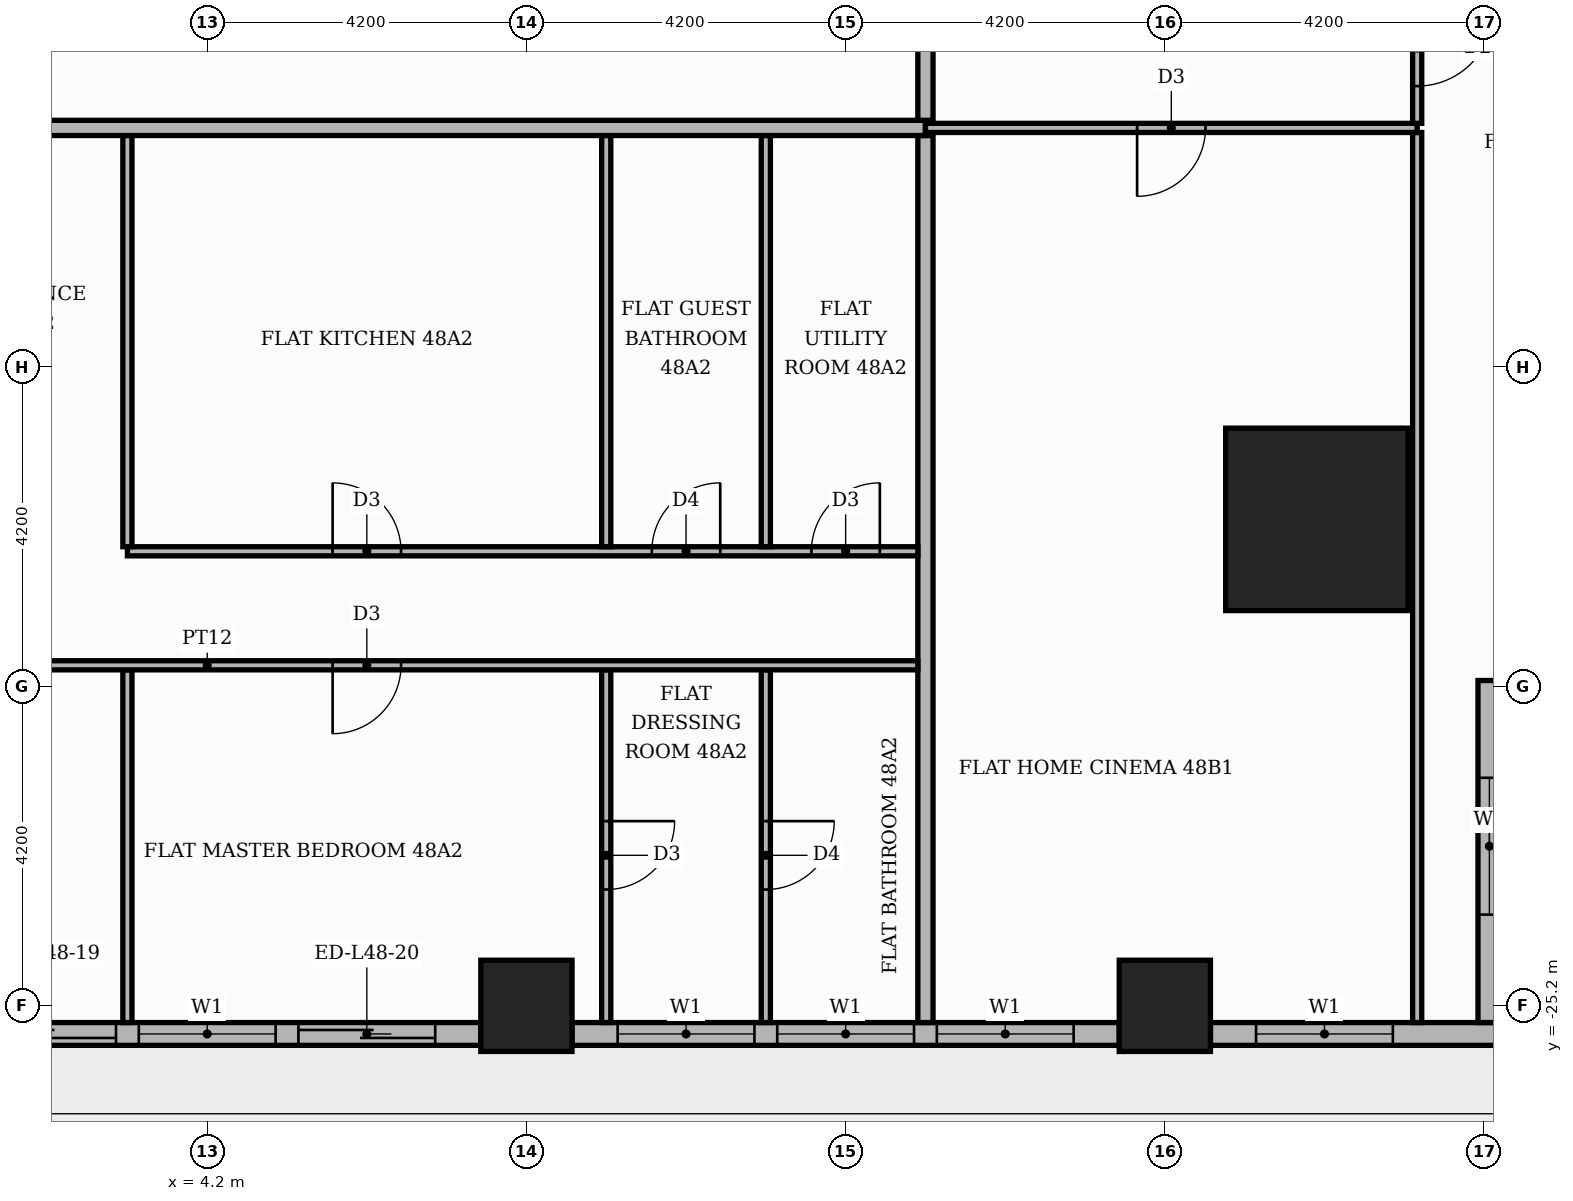
"""IFC4 building model, lengths in metres.
Left out: names, types, materials, properties, quantities, classifications, styles, units other than length and angle.
Written with IfcOpenShell. Run it as: python <this file> out.ifc"""

import sys

from ifc_helpers import new_model, si_unit, direction, frame, frame_2d, origin, origin_2d, place, context, subcontext, project, spatial, rectangle, extrude, element, fill, save


model = new_model("IFC4")
c1 = context("Model", 3, precision=1e-05, world=origin(), true_north=direction((0.0, 1.0)))
c2 = subcontext(c1, "Body", "Model", "MODEL_VIEW")
j1 = project(units=[si_unit("LENGTHUNIT", "METRE"), si_unit("PLANEANGLEUNIT", "RADIAN")], contexts=[c1])
p1 = place(None, origin())
s1 = spatial("IfcSite", under=j1, at=p1, CompositionType="ELEMENT")
p2 = place(p1, origin())
s2 = spatial("IfcBuilding", under=s1, at=p2, CompositionType="ELEMENT")
p3 = place(p2, frame((0.0, 0.0, 204.0)))
s3 = spatial("IfcBuildingStorey", under=s2, at=p3, CompositionType="ELEMENT", Elevation=204.0)
p4 = place(p3, frame((18.8, -18.8, 0.0), z_axis=(0.0, 0.0, 1.0), x_axis=(1.0, 0.0, 0.0)))
e1 = element("IfcColumn", 1, at=p4, inside=s3, PredefinedType="COLUMN", context=c2, shape_type="SweptSolid", body=[
    extrude(rectangle(XDim=2.4, YDim=2.4, at=origin_2d()), origin(), (0.0, 0.0, 1.0), 3.9),
])
for number, where, z_axis, x_axis in (
    (2, (8.4, -25.2, 0.0), (0.0, 0.0, 1.0), (1.0, 0.0, 0.0)),
    (3, (16.8, -25.2, 0.0), (0.0, 0.0, 1.0), (1.0, 0.0, 0.0)),
):
    element("IfcColumn", number, at=place(p3, frame(where, z_axis=z_axis, x_axis=x_axis)), inside=s3, PredefinedType="COLUMN", context=c2, shape_type="SweptSolid", body=[
        extrude(rectangle(XDim=1.2, YDim=1.2, at=origin_2d()), origin(), (0.0, 0.0, 1.0), 3.9),
    ])
p5 = place(p3, frame((0.6, -25.57, 0.0), z_axis=(0.0, 0.0, 1.0), x_axis=(1.0, 0.0, 0.0)))
e4 = element("IfcWall", 4, at=p5, inside=s3, PredefinedType="STANDARD", context=c2, shape_type="SweptSolid", body=[
    extrude(rectangle(XDim=7.2, YDim=0.3, at=frame_2d((3.6, 0.0))), origin(), (0.0, 0.0, 1.0), 3.48),
])
p6 = place(p5, frame((0.6, 0.0, 0.0)))
e5 = element("IfcOpeningElement", 5, at=p6, cuts=e4, PredefinedType="OPENING", context=c2, shape_type="SweptSolid", body=[
    extrude(rectangle(XDim=1.8, YDim=2.4, at=frame_2d((0.9, 1.2))), frame((0.0, 0.16, 0.0), z_axis=(0.0, -1.0, 0.0), x_axis=(1.0, 0.0, 0.0)), (0.0, 0.0, 1.0), 0.32),
])
p7 = place(p5, frame((2.7, 0.0, 0.9)))
e6 = element("IfcOpeningElement", 6, at=p7, cuts=e4, PredefinedType="OPENING", context=c2, shape_type="SweptSolid", body=[
    extrude(rectangle(XDim=1.8, YDim=2.1, at=frame_2d((0.9, 1.05))), frame((0.0, 0.16, 0.0), z_axis=(0.0, -1.0, 0.0), x_axis=(1.0, 0.0, 0.0)), (0.0, 0.0, 1.0), 0.32),
])
p8 = place(p5, frame((4.8, 0.0, 0.0)))
e7 = element("IfcOpeningElement", 7, at=p8, cuts=e4, PredefinedType="OPENING", context=c2, shape_type="SweptSolid", body=[
    extrude(rectangle(XDim=1.8, YDim=2.4, at=frame_2d((0.9, 1.2))), frame((0.0, 0.16, 0.0), z_axis=(0.0, -1.0, 0.0), x_axis=(1.0, 0.0, 0.0)), (0.0, 0.0, 1.0), 0.32),
])
p9 = place(p3, frame((9.0, -25.57, 0.0), z_axis=(0.0, 0.0, 1.0), x_axis=(1.0, 0.0, 0.0)))
e8 = element("IfcWall", 8, at=p9, inside=s3, PredefinedType="STANDARD", context=c2, shape_type="SweptSolid", body=[
    extrude(rectangle(XDim=7.2, YDim=0.3, at=frame_2d((3.6, 0.0))), origin(), (0.0, 0.0, 1.0), 3.48),
])
p10 = place(p9, frame((0.6, 0.0, 0.9)))
e9 = element("IfcOpeningElement", 9, at=p10, cuts=e8, PredefinedType="OPENING", context=c2, shape_type="SweptSolid", body=[
    extrude(rectangle(XDim=1.8, YDim=2.1, at=frame_2d((0.9, 1.05))), frame((0.0, 0.16, 0.0), z_axis=(0.0, -1.0, 0.0), x_axis=(1.0, 0.0, 0.0)), (0.0, 0.0, 1.0), 0.32),
])
p11 = place(p9, frame((2.7, 0.0, 0.9)))
e10 = element("IfcOpeningElement", 10, at=p11, cuts=e8, PredefinedType="OPENING", context=c2, shape_type="SweptSolid", body=[
    extrude(rectangle(XDim=1.8, YDim=2.1, at=frame_2d((0.9, 1.05))), frame((0.0, 0.16, 0.0), z_axis=(0.0, -1.0, 0.0), x_axis=(1.0, 0.0, 0.0)), (0.0, 0.0, 1.0), 0.32),
])
p12 = place(p9, frame((4.8, 0.0, 0.9)))
e11 = element("IfcOpeningElement", 11, at=p12, cuts=e8, PredefinedType="OPENING", context=c2, shape_type="SweptSolid", body=[
    extrude(rectangle(XDim=1.8, YDim=2.1, at=frame_2d((0.9, 1.05))), frame((0.0, 0.16, 0.0), z_axis=(0.0, -1.0, 0.0), x_axis=(1.0, 0.0, 0.0)), (0.0, 0.0, 1.0), 0.32),
])
p13 = place(p3, frame((17.4, -25.57, 0.0), z_axis=(0.0, 0.0, 1.0), x_axis=(1.0, 0.0, 0.0)))
e12 = element("IfcWall", 12, at=p13, inside=s3, PredefinedType="STANDARD", context=c2, shape_type="SweptSolid", body=[
    extrude(rectangle(XDim=3.82, YDim=0.3, at=frame_2d((1.91, 0.0))), origin(), (0.0, 0.0, 1.0), 3.48),
])
p14 = place(p13, frame((0.6, 0.0, 0.9)))
e13 = element("IfcOpeningElement", 13, at=p14, cuts=e12, PredefinedType="OPENING", context=c2, shape_type="SweptSolid", body=[
    extrude(rectangle(XDim=1.8, YDim=2.1, at=frame_2d((0.9, 1.05))), frame((0.0, 0.16, 0.0), z_axis=(0.0, -1.0, 0.0), x_axis=(1.0, 0.0, 0.0)), (0.0, 0.0, 1.0), 0.32),
])
p15 = place(p3, frame((21.07, -25.42, 0.0), z_axis=(0.0, 0.0, 1.0), x_axis=(0.0, 1.0, 0.0)))
e14 = element("IfcWall", 14, at=p15, inside=s3, PredefinedType="STANDARD", context=c2, shape_type="SweptSolid", body=[
    extrude(rectangle(XDim=4.5, YDim=0.3, at=frame_2d((2.25, 0.0))), origin(), (0.0, 0.0, 1.0), 3.48),
])
p16 = place(p15, frame((1.42, 0.0, 0.9)))
e15 = element("IfcOpeningElement", 15, at=p16, cuts=e14, PredefinedType="OPENING", context=c2, shape_type="SweptSolid", body=[
    extrude(rectangle(XDim=1.8, YDim=2.1, at=frame_2d((0.9, 1.05))), frame((0.0, 0.16, 0.0), z_axis=(0.0, -1.0, 0.0), x_axis=(1.0, 0.0, 0.0)), (0.0, 0.0, 1.0), 0.32),
])
p17 = place(p3, frame((3.15, -25.42, 0.0), z_axis=(0.0, 0.0, 1.0), x_axis=(0.0, 1.0, 0.0)))
e16 = element("IfcWall", 16, at=p17, inside=s3, PredefinedType="PARTITIONING", context=c2, shape_type="SweptSolid", body=[
    extrude(rectangle(XDim=4.64, YDim=0.12, at=frame_2d((2.32, 0.0))), origin(), (0.0, 0.0, 1.0), 3.48),
])
p18 = place(p3, frame((9.45, -25.42, 0.0), z_axis=(0.0, 0.0, 1.0), x_axis=(0.0, 1.0, 0.0)))
e17 = element("IfcWall", 17, at=p18, inside=s3, PredefinedType="PARTITIONING", context=c2, shape_type="SweptSolid", body=[
    extrude(rectangle(XDim=4.64, YDim=0.12, at=frame_2d((2.32, 0.0))), origin(), (0.0, 0.0, 1.0), 3.48),
])
p19 = place(p18, frame((1.75, 0.0, 0.0)))
e18 = element("IfcOpeningElement", 18, at=p19, cuts=e17, PredefinedType="OPENING", context=c2, shape_type="SweptSolid", body=[
    extrude(rectangle(XDim=0.9, YDim=2.1, at=frame_2d((0.45, 1.05))), frame((0.0, 0.07, 0.0), z_axis=(0.0, -1.0, 0.0), x_axis=(1.0, 0.0, 0.0)), (0.0, 0.0, 1.0), 0.14),
])
p20 = place(p3, frame((11.55, -25.42, 0.0), z_axis=(0.0, 0.0, 1.0), x_axis=(0.0, 1.0, 0.0)))
e19 = element("IfcWall", 19, at=p20, inside=s3, PredefinedType="PARTITIONING", context=c2, shape_type="SweptSolid", body=[
    extrude(rectangle(XDim=4.64, YDim=0.12, at=frame_2d((2.32, 0.0))), origin(), (0.0, 0.0, 1.0), 3.48),
])
p21 = place(p20, frame((1.75, 0.0, 0.0)))
e20 = element("IfcOpeningElement", 20, at=p21, cuts=e19, PredefinedType="OPENING", context=c2, shape_type="SweptSolid", body=[
    extrude(rectangle(XDim=0.9, YDim=2.1, at=frame_2d((0.45, 1.05))), frame((0.0, 0.07, 0.0), z_axis=(0.0, -1.0, 0.0), x_axis=(1.0, 0.0, 0.0)), (0.0, 0.0, 1.0), 0.14),
])
p22 = place(p3, frame((13.65, -25.42, 0.0), z_axis=(0.0, 0.0, 1.0), x_axis=(0.0, 1.0, 0.0)))
e21 = element("IfcWall", 21, at=p22, inside=s3, PredefinedType="PARTITIONING", context=c2, shape_type="SweptSolid", body=[
    extrude(rectangle(XDim=11.67, YDim=0.2, at=frame_2d((5.835, 0.0))), origin(), (0.0, 0.0, 1.0), 3.48),
])
p23 = place(p3, frame((20.12, -25.42, 0.0), z_axis=(0.0, 0.0, 1.0), x_axis=(0.0, 1.0, 0.0)))
e22 = element("IfcWall", 22, at=p23, inside=s3, PredefinedType="PARTITIONING", context=c2, shape_type="SweptSolid", body=[
    extrude(rectangle(XDim=11.71, YDim=0.12, at=frame_2d((5.855, 0.0))), origin(), (0.0, 0.0, 1.0), 3.48),
])
p24 = place(p3, frame((-5.15, -20.72, 0.0), z_axis=(0.0, 0.0, 1.0), x_axis=(1.0, 0.0, 0.0)))
e23 = element("IfcWall", 23, at=p24, inside=s3, PredefinedType="PARTITIONING", context=c2, shape_type="SweptSolid", body=[
    extrude(rectangle(XDim=18.7, YDim=0.12, at=frame_2d((9.35, 0.0))), origin(), (0.0, 0.0, 1.0), 3.48),
])
p25 = place(p24, frame((3.6, 0.0, 0.0)))
e24 = element("IfcOpeningElement", 24, at=p25, cuts=e23, PredefinedType="OPENING", context=c2, shape_type="SweptSolid", body=[
    extrude(rectangle(XDim=1.0, YDim=2.1, at=frame_2d((0.5, 1.05))), frame((0.0, 0.07, 0.0), z_axis=(0.0, -1.0, 0.0), x_axis=(1.0, 0.0, 0.0)), (0.0, 0.0, 1.0), 0.14),
])
p26 = place(p24, frame((11.0, 0.0, 0.0)))
e25 = element("IfcOpeningElement", 25, at=p26, cuts=e23, PredefinedType="OPENING", context=c2, shape_type="SweptSolid", body=[
    extrude(rectangle(XDim=0.9, YDim=2.1, at=frame_2d((0.45, 1.05))), frame((0.0, 0.07, 0.0), z_axis=(0.0, -1.0, 0.0), x_axis=(1.0, 0.0, 0.0)), (0.0, 0.0, 1.0), 0.14),
])
p27 = place(p3, frame((3.15, -19.22, 0.0), z_axis=(0.0, 0.0, 1.0), x_axis=(1.0, 0.0, 0.0)))
e26 = element("IfcWall", 26, at=p27, inside=s3, PredefinedType="PARTITIONING", context=c2, shape_type="SweptSolid", body=[
    extrude(rectangle(XDim=10.4, YDim=0.12, at=frame_2d((5.2, 0.0))), origin(), (0.0, 0.0, 1.0), 3.48),
])
p28 = place(p27, frame((2.7, 0.0, 0.0)))
e27 = element("IfcOpeningElement", 27, at=p28, cuts=e26, PredefinedType="OPENING", context=c2, shape_type="SweptSolid", body=[
    extrude(rectangle(XDim=0.9, YDim=2.1, at=frame_2d((0.45, 1.05))), frame((0.0, 0.07, 0.0), z_axis=(0.0, -1.0, 0.0), x_axis=(1.0, 0.0, 0.0)), (0.0, 0.0, 1.0), 0.14),
])
p29 = place(p27, frame((6.9, 0.0, 0.0)))
e28 = element("IfcOpeningElement", 28, at=p29, cuts=e26, PredefinedType="OPENING", context=c2, shape_type="SweptSolid", body=[
    extrude(rectangle(XDim=0.9, YDim=2.1, at=frame_2d((0.45, 1.05))), frame((0.0, 0.07, 0.0), z_axis=(0.0, -1.0, 0.0), x_axis=(1.0, 0.0, 0.0)), (0.0, 0.0, 1.0), 0.14),
])
p30 = place(p27, frame((9.0, 0.0, 0.0)))
e29 = element("IfcOpeningElement", 29, at=p30, cuts=e26, PredefinedType="OPENING", context=c2, shape_type="SweptSolid", body=[
    extrude(rectangle(XDim=0.9, YDim=2.1, at=frame_2d((0.45, 1.05))), frame((0.0, 0.07, 0.0), z_axis=(0.0, -1.0, 0.0), x_axis=(1.0, 0.0, 0.0)), (0.0, 0.0, 1.0), 0.14),
])
for number, where, z_axis, x_axis in (
    (30, (3.15, -19.16, 0.0), (0.0, 0.0, 1.0), (0.0, 1.0, 0.0)),
    (31, (9.45, -19.16, 0.0), (0.0, 0.0, 1.0), (0.0, 1.0, 0.0)),
    (32, (11.55, -19.16, 0.0), (0.0, 0.0, 1.0), (0.0, 1.0, 0.0)),
):
    element("IfcWall", number, at=place(p3, frame(where, z_axis=z_axis, x_axis=x_axis)), inside=s3, PredefinedType="PARTITIONING", context=c2, shape_type="SweptSolid", body=[
        extrude(rectangle(XDim=5.41, YDim=0.12, at=frame_2d((2.705, 0.0))), origin(), (0.0, 0.0, 1.0), 3.48),
    ])
p31 = place(p3, frame((-25.42, -13.65, 0.0), z_axis=(0.0, 0.0, 1.0), x_axis=(1.0, 0.0, 0.0)))
e33 = element("IfcWall", 33, at=p31, inside=s3, PredefinedType="PARTITIONING", context=c2, shape_type="SweptSolid", body=[
    extrude(rectangle(XDim=39.07, YDim=0.2, at=frame_2d((19.535, 0.0))), origin(), (0.0, 0.0, 1.0), 3.48),
])
p32 = place(p31, frame((13.32, 0.0, 0.0)))
e34 = element("IfcOpeningElement", 34, at=p32, cuts=e33, PredefinedType="OPENING", context=c2, shape_type="SweptSolid", body=[
    extrude(rectangle(XDim=1.1, YDim=2.4, at=frame_2d((0.55, 1.2))), frame((0.0, 0.11, 0.0), z_axis=(0.0, -1.0, 0.0), x_axis=(1.0, 0.0, 0.0)), (0.0, 0.0, 1.0), 0.22),
])
p33 = place(p31, frame((25.92, 0.0, 0.0)))
e35 = element("IfcOpeningElement", 35, at=p33, cuts=e33, PredefinedType="OPENING", context=c2, shape_type="SweptSolid", body=[
    extrude(rectangle(XDim=1.1, YDim=2.4, at=frame_2d((0.55, 1.2))), frame((0.0, 0.11, 0.0), z_axis=(0.0, -1.0, 0.0), x_axis=(1.0, 0.0, 0.0)), (0.0, 0.0, 1.0), 0.22),
])
p34 = place(p3, frame((13.65, -13.65, 0.0), z_axis=(0.0, 0.0, 1.0), x_axis=(1.0, 0.0, 0.0)))
e36 = element("IfcWall", 36, at=p34, inside=s3, PredefinedType="PARTITIONING", context=c2, shape_type="SweptSolid", body=[
    extrude(rectangle(XDim=6.47, YDim=0.12, at=frame_2d((3.235, 0.0))), origin(), (0.0, 0.0, 1.0), 3.48),
])
p35 = place(p34, frame((2.785, 0.0, 0.0)))
e37 = element("IfcOpeningElement", 37, at=p35, cuts=e36, PredefinedType="OPENING", context=c2, shape_type="SweptSolid", body=[
    extrude(rectangle(XDim=0.9, YDim=2.1, at=frame_2d((0.45, 1.05))), frame((0.0, 0.07, 0.0), z_axis=(0.0, -1.0, 0.0), x_axis=(1.0, 0.0, 0.0)), (0.0, 0.0, 1.0), 0.14),
])
p36 = place(p3, frame((20.12, -13.59, 0.0), z_axis=(0.0, 0.0, 1.0), x_axis=(0.0, 1.0, 0.0)))
e38 = element("IfcWall", 38, at=p36, inside=s3, PredefinedType="PARTITIONING", context=c2, shape_type="SweptSolid", body=[
    extrude(rectangle(XDim=1.98, YDim=0.12, at=frame_2d((0.99, 0.0))), origin(), (0.0, 0.0, 1.0), 3.48),
])
p37 = place(p36, frame((0.49, 0.0, 0.0)))
e39 = element("IfcOpeningElement", 39, at=p37, cuts=e38, PredefinedType="OPENING", context=c2, shape_type="SweptSolid", body=[
    extrude(rectangle(XDim=1.0, YDim=2.1, at=frame_2d((0.5, 1.05))), frame((0.0, 0.07, 0.0), z_axis=(0.0, -1.0, 0.0), x_axis=(1.0, 0.0, 0.0)), (0.0, 0.0, 1.0), 0.14),
])
p38 = place(p3, frame((13.65, -13.55, 0.0), z_axis=(0.0, 0.0, 1.0), x_axis=(0.0, 1.0, 0.0)))
e40 = element("IfcWall", 40, at=p38, inside=s3, PredefinedType="PARTITIONING", context=c2, shape_type="SweptSolid", body=[
    extrude(rectangle(XDim=2.45, YDim=0.2, at=frame_2d((1.225, 0.0))), origin(), (0.0, 0.0, 1.0), 3.48),
])
p39 = place(p6, origin())
e41 = element("IfcDoor", 41, at=p39, inside=s3, OperationType="SLIDING_TO_LEFT", PredefinedType="DOOR", context=c2, shape_type="SweptSolid", body=[
    extrude(rectangle(XDim=1.8, YDim=2.4, at=frame_2d((0.9, 1.2))), frame((0.0, 0.025, 0.0), z_axis=(0.0, -1.0, 0.0), x_axis=(1.0, 0.0, 0.0)), (0.0, 0.0, 1.0), 0.05),
])
fill(e5, e41)
p40 = place(p7, origin())
e42 = element("IfcWindow", 42, at=p40, inside=s3, PartitioningType="SINGLE_PANEL", PredefinedType="WINDOW", context=c2, shape_type="SweptSolid", body=[
    extrude(rectangle(XDim=1.8, YDim=2.1, at=frame_2d((0.9, 1.05))), frame((0.0, 0.03, 0.0), z_axis=(0.0, -1.0, 0.0), x_axis=(1.0, 0.0, 0.0)), (0.0, 0.0, 1.0), 0.06),
])
fill(e6, e42)
p41 = place(p8, origin())
e43 = element("IfcDoor", 43, at=p41, inside=s3, OperationType="SLIDING_TO_RIGHT", PredefinedType="DOOR", context=c2, shape_type="SweptSolid", body=[
    extrude(rectangle(XDim=1.8, YDim=2.4, at=frame_2d((0.9, 1.2))), frame((0.0, 0.025, 0.0), z_axis=(0.0, -1.0, 0.0), x_axis=(1.0, 0.0, 0.0)), (0.0, 0.0, 1.0), 0.05),
])
fill(e7, e43)
p42 = place(p10, origin())
e44 = element("IfcWindow", 44, at=p42, inside=s3, PartitioningType="SINGLE_PANEL", PredefinedType="WINDOW", context=c2, shape_type="SweptSolid", body=[
    extrude(rectangle(XDim=1.8, YDim=2.1, at=frame_2d((0.9, 1.05))), frame((0.0, 0.03, 0.0), z_axis=(0.0, -1.0, 0.0), x_axis=(1.0, 0.0, 0.0)), (0.0, 0.0, 1.0), 0.06),
])
fill(e9, e44)
p43 = place(p11, origin())
e45 = element("IfcWindow", 45, at=p43, inside=s3, PartitioningType="SINGLE_PANEL", PredefinedType="WINDOW", context=c2, shape_type="SweptSolid", body=[
    extrude(rectangle(XDim=1.8, YDim=2.1, at=frame_2d((0.9, 1.05))), frame((0.0, 0.03, 0.0), z_axis=(0.0, -1.0, 0.0), x_axis=(1.0, 0.0, 0.0)), (0.0, 0.0, 1.0), 0.06),
])
fill(e10, e45)
p44 = place(p12, origin())
e46 = element("IfcWindow", 46, at=p44, inside=s3, PartitioningType="SINGLE_PANEL", PredefinedType="WINDOW", context=c2, shape_type="SweptSolid", body=[
    extrude(rectangle(XDim=1.8, YDim=2.1, at=frame_2d((0.9, 1.05))), frame((0.0, 0.03, 0.0), z_axis=(0.0, -1.0, 0.0), x_axis=(1.0, 0.0, 0.0)), (0.0, 0.0, 1.0), 0.06),
])
fill(e11, e46)
p45 = place(p14, origin())
e47 = element("IfcWindow", 47, at=p45, inside=s3, PartitioningType="SINGLE_PANEL", PredefinedType="WINDOW", context=c2, shape_type="SweptSolid", body=[
    extrude(rectangle(XDim=1.8, YDim=2.1, at=frame_2d((0.9, 1.05))), frame((0.0, 0.03, 0.0), z_axis=(0.0, -1.0, 0.0), x_axis=(1.0, 0.0, 0.0)), (0.0, 0.0, 1.0), 0.06),
])
fill(e13, e47)
p46 = place(p16, origin())
e48 = element("IfcWindow", 48, at=p46, inside=s3, PartitioningType="SINGLE_PANEL", PredefinedType="WINDOW", context=c2, shape_type="SweptSolid", body=[
    extrude(rectangle(XDim=1.8, YDim=2.1, at=frame_2d((0.9, 1.05))), frame((0.0, 0.03, 0.0), z_axis=(0.0, -1.0, 0.0), x_axis=(1.0, 0.0, 0.0)), (0.0, 0.0, 1.0), 0.06),
])
fill(e15, e48)
p47 = place(p28, origin())
e49 = element("IfcDoor", 49, at=p47, inside=s3, OperationType="SINGLE_SWING_LEFT", PredefinedType="DOOR", context=c2, shape_type="SweptSolid", body=[
    extrude(rectangle(XDim=0.9, YDim=2.1, at=frame_2d((0.45, 1.05))), frame((0.0, 0.025, 0.0), z_axis=(0.0, -1.0, 0.0), x_axis=(1.0, 0.0, 0.0)), (0.0, 0.0, 1.0), 0.05),
])
fill(e27, e49)
p48 = place(p29, origin())
e50 = element("IfcDoor", 50, at=p48, inside=s3, OperationType="SINGLE_SWING_RIGHT", PredefinedType="DOOR", context=c2, shape_type="SweptSolid", body=[
    extrude(rectangle(XDim=0.9, YDim=2.1, at=frame_2d((0.45, 1.05))), frame((0.0, 0.025, 0.0), z_axis=(0.0, -1.0, 0.0), x_axis=(1.0, 0.0, 0.0)), (0.0, 0.0, 1.0), 0.05),
])
fill(e28, e50)
p49 = place(p30, origin())
e51 = element("IfcDoor", 51, at=p49, inside=s3, OperationType="SINGLE_SWING_RIGHT", PredefinedType="DOOR", context=c2, shape_type="SweptSolid", body=[
    extrude(rectangle(XDim=0.9, YDim=2.1, at=frame_2d((0.45, 1.05))), frame((0.0, 0.025, 0.0), z_axis=(0.0, -1.0, 0.0), x_axis=(1.0, 0.0, 0.0)), (0.0, 0.0, 1.0), 0.05),
])
fill(e29, e51)
p50 = place(p26, frame((0.9, 0.0, 0.0), z_axis=(0.0, 0.0, 1.0), x_axis=(-1.0, 0.0, 0.0)))
e52 = element("IfcDoor", 52, at=p50, inside=s3, OperationType="SINGLE_SWING_LEFT", PredefinedType="DOOR", context=c2, shape_type="SweptSolid", body=[
    extrude(rectangle(XDim=0.9, YDim=2.1, at=frame_2d((0.45, 1.05))), frame((0.0, 0.025, 0.0), z_axis=(0.0, -1.0, 0.0), x_axis=(1.0, 0.0, 0.0)), (0.0, 0.0, 1.0), 0.05),
])
fill(e25, e52)
p51 = place(p19, frame((0.9, 0.0, 0.0), z_axis=(0.0, 0.0, 1.0), x_axis=(-1.0, 0.0, 0.0)))
e53 = element("IfcDoor", 53, at=p51, inside=s3, OperationType="SINGLE_SWING_RIGHT", PredefinedType="DOOR", context=c2, shape_type="SweptSolid", body=[
    extrude(rectangle(XDim=0.9, YDim=2.1, at=frame_2d((0.45, 1.05))), frame((0.0, 0.025, 0.0), z_axis=(0.0, -1.0, 0.0), x_axis=(1.0, 0.0, 0.0)), (0.0, 0.0, 1.0), 0.05),
])
fill(e18, e53)
p52 = place(p21, frame((0.9, 0.0, 0.0), z_axis=(0.0, 0.0, 1.0), x_axis=(-1.0, 0.0, 0.0)))
e54 = element("IfcDoor", 54, at=p52, inside=s3, OperationType="SINGLE_SWING_RIGHT", PredefinedType="DOOR", context=c2, shape_type="SweptSolid", body=[
    extrude(rectangle(XDim=0.9, YDim=2.1, at=frame_2d((0.45, 1.05))), frame((0.0, 0.025, 0.0), z_axis=(0.0, -1.0, 0.0), x_axis=(1.0, 0.0, 0.0)), (0.0, 0.0, 1.0), 0.05),
])
fill(e20, e54)
p53 = place(p35, frame((0.9, 0.0, 0.0), z_axis=(0.0, 0.0, 1.0), x_axis=(-1.0, 0.0, 0.0)))
e55 = element("IfcDoor", 55, at=p53, inside=s3, OperationType="SINGLE_SWING_LEFT", PredefinedType="DOOR", context=c2, shape_type="SweptSolid", body=[
    extrude(rectangle(XDim=0.9, YDim=2.1, at=frame_2d((0.45, 1.05))), frame((0.0, 0.025, 0.0), z_axis=(0.0, -1.0, 0.0), x_axis=(1.0, 0.0, 0.0)), (0.0, 0.0, 1.0), 0.05),
])
fill(e37, e55)
p54 = place(p37, frame((1.0, 0.0, 0.0), z_axis=(0.0, 0.0, 1.0), x_axis=(-1.0, 0.0, 0.0)))
e56 = element("IfcDoor", 56, at=p54, inside=s3, OperationType="SINGLE_SWING_RIGHT", PredefinedType="DOOR", context=c2, shape_type="SweptSolid", body=[
    extrude(rectangle(XDim=1.0, YDim=2.1, at=frame_2d((0.5, 1.05))), frame((0.0, 0.025, 0.0), z_axis=(0.0, -1.0, 0.0), x_axis=(1.0, 0.0, 0.0)), (0.0, 0.0, 1.0), 0.05),
])
fill(e39, e56)
save(model, sys.argv[1])
